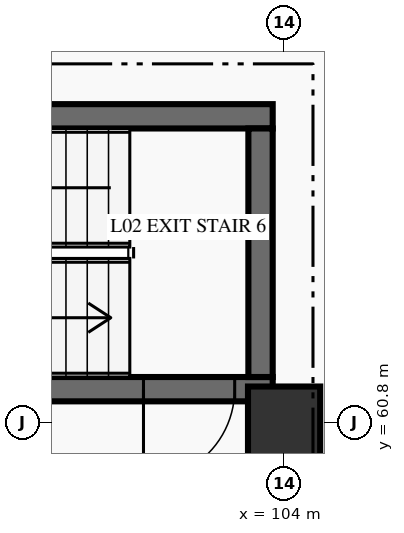
"""IFC4 building model, lengths in metres.
Left out: names, types, materials, properties, quantities, classifications, styles, units other than length and angle.
Written with IfcOpenShell. Run it as: python <this file> out.ifc"""

import sys

from ifc_helpers import new_model, si_unit, direction, frame, frame_2d, origin, origin_2d, place, context, subcontext, project, spatial, rectangle, extrude, element, fill, save


model = new_model("IFC4")
c1 = context("Model", 3, precision=1e-05, world=origin(), true_north=direction((0.0, 1.0)))
c2 = subcontext(c1, "Body", "Model", "MODEL_VIEW")
j1 = project(units=[si_unit("LENGTHUNIT", "METRE"), si_unit("PLANEANGLEUNIT", "RADIAN")], contexts=[c1])
p1 = place(None, origin())
s1 = spatial("IfcSite", under=j1, at=p1, CompositionType="ELEMENT")
p2 = place(p1, origin())
s2 = spatial("IfcBuilding", under=s1, at=p2, CompositionType="ELEMENT")
p3 = place(p2, frame((0.0, 0.0, 5.4)))
s3 = spatial("IfcBuildingStorey", under=s2, at=p3, CompositionType="ELEMENT", Elevation=5.4)
p4 = place(p3, frame((104.0, 60.8, 0.0), z_axis=(0.0, 0.0, 1.0), x_axis=(1.0, 0.0, 0.0)))
e1 = element("IfcColumn", 1, at=p4, inside=s3, PredefinedType="COLUMN", context=c2, shape_type="SweptSolid", body=[
    extrude(rectangle(XDim=0.95, YDim=0.95, at=origin_2d()), origin(), (0.0, 0.0, 1.0), 4.8),
])
p5 = place(p3, frame((103.85, 61.24, 0.0), z_axis=(0.0, 0.0, 1.0), x_axis=(-1.0, 0.0, 0.0)))
e2 = element("IfcWall", 2, at=p5, inside=s3, PredefinedType="SHEAR", context=c2, shape_type="SweptSolid", body=[
    extrude(rectangle(XDim=7.7, YDim=0.32, at=frame_2d((3.85, 0.0))), origin(), (0.0, 0.0, 1.0), 4.8),
])
p6 = place(p5, frame((0.5, 0.0, 0.0)))
e3 = element("IfcOpeningElement", 3, at=p6, cuts=e2, PredefinedType="OPENING", context=c2, shape_type="SweptSolid", body=[
    extrude(rectangle(XDim=1.2, YDim=2.2, at=frame_2d((0.6, 1.1))), frame((0.0, 0.17, 0.0), z_axis=(0.0, -1.0, 0.0), x_axis=(1.0, 0.0, 0.0)), (0.0, 0.0, 1.0), 0.34),
])
p7 = place(p3, frame((96.15, 64.83, 0.0), z_axis=(0.0, 0.0, 1.0), x_axis=(1.0, 0.0, 0.0)))
e4 = element("IfcWall", 4, at=p7, inside=s3, PredefinedType="SHEAR", context=c2, shape_type="SweptSolid", body=[
    extrude(rectangle(XDim=7.7, YDim=0.32, at=frame_2d((3.85, 0.0))), origin(), (0.0, 0.0, 1.0), 4.8),
])
p8 = place(p3, frame((103.69, 64.67, 0.0), z_axis=(0.0, 0.0, 1.0), x_axis=(0.0, -1.0, 0.0)))
e5 = element("IfcWall", 5, at=p8, inside=s3, PredefinedType="SHEAR", context=c2, shape_type="SweptSolid", body=[
    extrude(rectangle(XDim=3.27, YDim=0.32, at=frame_2d((1.635, 0.0))), origin(), (0.0, 0.0, 1.0), 4.8),
])
p9 = place(p6, origin())
e6 = element("IfcDoor", 6, at=p9, inside=s3, OperationType="SINGLE_SWING_RIGHT", PredefinedType="DOOR", context=c2, shape_type="SweptSolid", body=[
    extrude(rectangle(XDim=1.2, YDim=2.2, at=frame_2d((0.6, 1.1))), frame((0.0, 0.025, 0.0), z_axis=(0.0, -1.0, 0.0), x_axis=(1.0, 0.0, 0.0)), (0.0, 0.0, 1.0), 0.05),
])
fill(e3, e6)
save(model, sys.argv[1])
